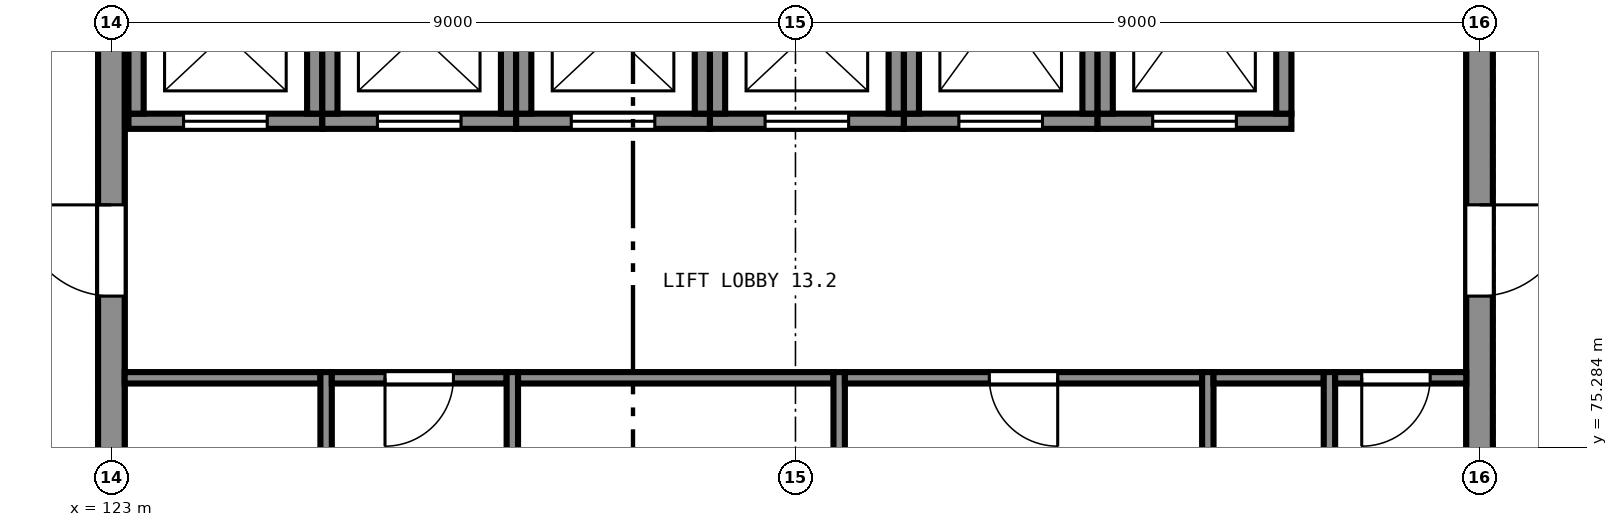
"""IFC4 building model, lengths in metres.
Left out: names, types, materials, properties, quantities, classifications, styles, units other than length and angle.
Written with IfcOpenShell. Run it as: python <this file> out.ifc"""

import sys

from ifc_helpers import new_model, si_unit, direction, frame, frame_2d, origin, place, context, subcontext, project, spatial, rectangle, extrude, element, fill, save


model = new_model("IFC4")
c1 = context("Model", 3, precision=1e-05, world=origin(), true_north=direction((0.0, 1.0)))
c2 = subcontext(c1, "Body", "Model", "MODEL_VIEW")
j1 = project(units=[si_unit("LENGTHUNIT", "METRE"), si_unit("PLANEANGLEUNIT", "RADIAN")], contexts=[c1])
p1 = place(None, origin())
s1 = spatial("IfcSite", under=j1, at=p1, CompositionType="ELEMENT")
p2 = place(p1, origin())
s2 = spatial("IfcBuilding", under=s1, at=p2, CompositionType="ELEMENT")
p3 = place(p2, frame((0.0, 0.0, 53.5)))
s3 = spatial("IfcBuildingStorey", under=s2, at=p3, CompositionType="ELEMENT", Elevation=53.5)
p4 = place(p3, frame((141.0, 65.175, 0.0), z_axis=(0.0, 0.0, 1.0), x_axis=(0.0, 1.0, 0.0)))
e1 = element("IfcWall", 1, at=p4, inside=s3, PredefinedType="SHEAR", context=c2, shape_type="SweptSolid", body=[
    extrude(rectangle(XDim=17.65, YDim=0.35, at=frame_2d((8.825, 0.0))), origin(), (0.0, 0.0, 1.0), 4.0),
])
p5 = place(p4, frame((4.35, 0.0, 0.0)))
e2 = element("IfcOpeningElement", 2, at=p5, cuts=e1, PredefinedType="OPENING", context=c2, shape_type="SweptSolid", body=[
    extrude(rectangle(XDim=1.2, YDim=2.1, at=frame_2d((0.6, 1.05))), frame((0.0, 0.185, 0.0), z_axis=(0.0, -1.0, 0.0), x_axis=(1.0, 0.0, 0.0)), (0.0, 0.0, 1.0), 0.37),
])
p6 = place(p4, frame((12.1, 0.0, 0.0)))
e3 = element("IfcOpeningElement", 3, at=p6, cuts=e1, PredefinedType="OPENING", context=c2, shape_type="SweptSolid", body=[
    extrude(rectangle(XDim=1.2, YDim=2.1, at=frame_2d((0.6, 1.05))), frame((0.0, 0.185, 0.0), z_axis=(0.0, -1.0, 0.0), x_axis=(1.0, 0.0, 0.0)), (0.0, 0.0, 1.0), 0.37),
])
p7 = place(p3, frame((123.0, 82.825, 0.0), z_axis=(0.0, 0.0, 1.0), x_axis=(0.0, -1.0, 0.0)))
e4 = element("IfcWall", 4, at=p7, inside=s3, PredefinedType="SHEAR", context=c2, shape_type="SweptSolid", body=[
    extrude(rectangle(XDim=17.65, YDim=0.35, at=frame_2d((8.825, 0.0))), origin(), (0.0, 0.0, 1.0), 4.0),
])
p8 = place(p7, frame((12.1, 0.0, 0.0)))
e5 = element("IfcOpeningElement", 5, at=p8, cuts=e4, PredefinedType="OPENING", context=c2, shape_type="SweptSolid", body=[
    extrude(rectangle(XDim=1.2, YDim=2.1, at=frame_2d((0.6, 1.05))), frame((0.0, 0.185, 0.0), z_axis=(0.0, -1.0, 0.0), x_axis=(1.0, 0.0, 0.0)), (0.0, 0.0, 1.0), 0.37),
])
p9 = place(p7, frame((4.35, 0.0, 0.0)))
e6 = element("IfcOpeningElement", 6, at=p9, cuts=e4, PredefinedType="OPENING", context=c2, shape_type="SweptSolid", body=[
    extrude(rectangle(XDim=1.2, YDim=2.1, at=frame_2d((0.6, 1.05))), frame((0.0, 0.185, 0.0), z_axis=(0.0, -1.0, 0.0), x_axis=(1.0, 0.0, 0.0)), (0.0, 0.0, 1.0), 0.37),
])
p10 = place(p3, frame((123.225, 79.575, 0.0), z_axis=(0.0, 0.0, 1.0), x_axis=(1.0, 0.0, 0.0)))
e7 = element("IfcWall", 7, at=p10, inside=s3, PredefinedType="SHEAR", context=c2, shape_type="SweptSolid", body=[
    extrude(rectangle(XDim=2.55, YDim=0.2, at=frame_2d((1.275, 0.0))), origin(), (0.0, 0.0, 1.0), 4.0),
])
p11 = place(p10, frame((0.725, 0.0, 0.0)))
e8 = element("IfcOpeningElement", 8, at=p11, cuts=e7, PredefinedType="OPENING", context=c2, shape_type="SweptSolid", body=[
    extrude(rectangle(XDim=1.1, YDim=2.1, at=frame_2d((0.55, 1.05))), frame((0.0, 0.11, 0.0), z_axis=(0.0, -1.0, 0.0), x_axis=(1.0, 0.0, 0.0)), (0.0, 0.0, 1.0), 0.22),
])
for number, where, z_axis, x_axis in (
    (9, (125.675, 79.675, 0.0), (0.0, 0.0, 1.0), (0.0, 1.0, 0.0)),
    (10, (123.325, 81.775, 0.0), (0.0, 0.0, 1.0), (0.0, -1.0, 0.0)),
):
    element("IfcWall", number, at=place(p3, frame(where, z_axis=z_axis, x_axis=x_axis)), inside=s3, PredefinedType="SHEAR", context=c2, shape_type="SweptSolid", body=[
        extrude(rectangle(XDim=2.1, YDim=0.2, at=frame_2d((1.05, 0.0))), origin(), (0.0, 0.0, 1.0), 4.0),
    ])
p12 = place(p3, frame((125.775, 79.575, 0.0), z_axis=(0.0, 0.0, 1.0), x_axis=(1.0, 0.0, 0.0)))
e11 = element("IfcWall", 11, at=p12, inside=s3, PredefinedType="SHEAR", context=c2, shape_type="SweptSolid", body=[
    extrude(rectangle(XDim=2.55, YDim=0.2, at=frame_2d((1.275, 0.0))), origin(), (0.0, 0.0, 1.0), 4.0),
])
p13 = place(p12, frame((0.725, 0.0, 0.0)))
e12 = element("IfcOpeningElement", 12, at=p13, cuts=e11, PredefinedType="OPENING", context=c2, shape_type="SweptSolid", body=[
    extrude(rectangle(XDim=1.1, YDim=2.1, at=frame_2d((0.55, 1.05))), frame((0.0, 0.11, 0.0), z_axis=(0.0, -1.0, 0.0), x_axis=(1.0, 0.0, 0.0)), (0.0, 0.0, 1.0), 0.22),
])
for number, where, z_axis, x_axis in (
    (13, (128.225, 79.675, 0.0), (0.0, 0.0, 1.0), (0.0, 1.0, 0.0)),
    (14, (125.875, 81.775, 0.0), (0.0, 0.0, 1.0), (0.0, -1.0, 0.0)),
):
    element("IfcWall", number, at=place(p3, frame(where, z_axis=z_axis, x_axis=x_axis)), inside=s3, PredefinedType="SHEAR", context=c2, shape_type="SweptSolid", body=[
        extrude(rectangle(XDim=2.1, YDim=0.2, at=frame_2d((1.05, 0.0))), origin(), (0.0, 0.0, 1.0), 4.0),
    ])
p14 = place(p3, frame((128.325, 79.575, 0.0), z_axis=(0.0, 0.0, 1.0), x_axis=(1.0, 0.0, 0.0)))
e15 = element("IfcWall", 15, at=p14, inside=s3, PredefinedType="SHEAR", context=c2, shape_type="SweptSolid", body=[
    extrude(rectangle(XDim=2.55, YDim=0.2, at=frame_2d((1.275, 0.0))), origin(), (0.0, 0.0, 1.0), 4.0),
])
p15 = place(p14, frame((0.725, 0.0, 0.0)))
e16 = element("IfcOpeningElement", 16, at=p15, cuts=e15, PredefinedType="OPENING", context=c2, shape_type="SweptSolid", body=[
    extrude(rectangle(XDim=1.1, YDim=2.1, at=frame_2d((0.55, 1.05))), frame((0.0, 0.11, 0.0), z_axis=(0.0, -1.0, 0.0), x_axis=(1.0, 0.0, 0.0)), (0.0, 0.0, 1.0), 0.22),
])
for number, where, z_axis, x_axis in (
    (17, (130.775, 79.675, 0.0), (0.0, 0.0, 1.0), (0.0, 1.0, 0.0)),
    (18, (128.425, 81.775, 0.0), (0.0, 0.0, 1.0), (0.0, -1.0, 0.0)),
):
    element("IfcWall", number, at=place(p3, frame(where, z_axis=z_axis, x_axis=x_axis)), inside=s3, PredefinedType="SHEAR", context=c2, shape_type="SweptSolid", body=[
        extrude(rectangle(XDim=2.1, YDim=0.2, at=frame_2d((1.05, 0.0))), origin(), (0.0, 0.0, 1.0), 4.0),
    ])
p16 = place(p3, frame((130.875, 79.575, 0.0), z_axis=(0.0, 0.0, 1.0), x_axis=(1.0, 0.0, 0.0)))
e19 = element("IfcWall", 19, at=p16, inside=s3, PredefinedType="SHEAR", context=c2, shape_type="SweptSolid", body=[
    extrude(rectangle(XDim=2.55, YDim=0.2, at=frame_2d((1.275, 0.0))), origin(), (0.0, 0.0, 1.0), 4.0),
])
p17 = place(p16, frame((0.725, 0.0, 0.0)))
e20 = element("IfcOpeningElement", 20, at=p17, cuts=e19, PredefinedType="OPENING", context=c2, shape_type="SweptSolid", body=[
    extrude(rectangle(XDim=1.1, YDim=2.1, at=frame_2d((0.55, 1.05))), frame((0.0, 0.11, 0.0), z_axis=(0.0, -1.0, 0.0), x_axis=(1.0, 0.0, 0.0)), (0.0, 0.0, 1.0), 0.22),
])
for number, where, z_axis, x_axis in (
    (21, (133.325, 79.675, 0.0), (0.0, 0.0, 1.0), (0.0, 1.0, 0.0)),
    (22, (130.975, 81.775, 0.0), (0.0, 0.0, 1.0), (0.0, -1.0, 0.0)),
):
    element("IfcWall", number, at=place(p3, frame(where, z_axis=z_axis, x_axis=x_axis)), inside=s3, PredefinedType="SHEAR", context=c2, shape_type="SweptSolid", body=[
        extrude(rectangle(XDim=2.1, YDim=0.2, at=frame_2d((1.05, 0.0))), origin(), (0.0, 0.0, 1.0), 4.0),
    ])
p18 = place(p3, frame((133.425, 79.575, 0.0), z_axis=(0.0, 0.0, 1.0), x_axis=(1.0, 0.0, 0.0)))
e23 = element("IfcWall", 23, at=p18, inside=s3, PredefinedType="SHEAR", context=c2, shape_type="SweptSolid", body=[
    extrude(rectangle(XDim=2.55, YDim=0.2, at=frame_2d((1.275, 0.0))), origin(), (0.0, 0.0, 1.0), 4.0),
])
p19 = place(p18, frame((0.725, 0.0, 0.0)))
e24 = element("IfcOpeningElement", 24, at=p19, cuts=e23, PredefinedType="OPENING", context=c2, shape_type="SweptSolid", body=[
    extrude(rectangle(XDim=1.1, YDim=2.1, at=frame_2d((0.55, 1.05))), frame((0.0, 0.11, 0.0), z_axis=(0.0, -1.0, 0.0), x_axis=(1.0, 0.0, 0.0)), (0.0, 0.0, 1.0), 0.22),
])
for number, where, z_axis, x_axis in (
    (25, (135.875, 79.675, 0.0), (0.0, 0.0, 1.0), (0.0, 1.0, 0.0)),
    (26, (133.525, 82.475, 0.0), (0.0, 0.0, 1.0), (0.0, -1.0, 0.0)),
):
    element("IfcWall", number, at=place(p3, frame(where, z_axis=z_axis, x_axis=x_axis)), inside=s3, PredefinedType="SHEAR", context=c2, shape_type="SweptSolid", body=[
        extrude(rectangle(XDim=2.8, YDim=0.2, at=frame_2d((1.4, 0.0))), origin(), (0.0, 0.0, 1.0), 4.0),
    ])
p20 = place(p3, frame((135.975, 79.575, 0.0), z_axis=(0.0, 0.0, 1.0), x_axis=(1.0, 0.0, 0.0)))
e27 = element("IfcWall", 27, at=p20, inside=s3, PredefinedType="SHEAR", context=c2, shape_type="SweptSolid", body=[
    extrude(rectangle(XDim=2.55, YDim=0.2, at=frame_2d((1.275, 0.0))), origin(), (0.0, 0.0, 1.0), 4.0),
])
p21 = place(p20, frame((0.725, 0.0, 0.0)))
e28 = element("IfcOpeningElement", 28, at=p21, cuts=e27, PredefinedType="OPENING", context=c2, shape_type="SweptSolid", body=[
    extrude(rectangle(XDim=1.1, YDim=2.1, at=frame_2d((0.55, 1.05))), frame((0.0, 0.11, 0.0), z_axis=(0.0, -1.0, 0.0), x_axis=(1.0, 0.0, 0.0)), (0.0, 0.0, 1.0), 0.22),
])
for number, where, z_axis, x_axis in (
    (29, (138.425, 79.675, 0.0), (0.0, 0.0, 1.0), (0.0, 1.0, 0.0)),
    (30, (136.075, 82.475, 0.0), (0.0, 0.0, 1.0), (0.0, -1.0, 0.0)),
):
    element("IfcWall", number, at=place(p3, frame(where, z_axis=z_axis, x_axis=x_axis)), inside=s3, PredefinedType="SHEAR", context=c2, shape_type="SweptSolid", body=[
        extrude(rectangle(XDim=2.8, YDim=0.2, at=frame_2d((1.4, 0.0))), origin(), (0.0, 0.0, 1.0), 4.0),
    ])
p22 = place(p3, frame((125.825, 71.725, 0.0), z_axis=(0.0, 0.0, 1.0), x_axis=(0.0, 1.0, 0.0)))
e31 = element("IfcWall", 31, at=p22, inside=s3, PredefinedType="PARTITIONING", context=c2, shape_type="SweptSolid", body=[
    extrude(rectangle(XDim=4.55, YDim=0.15, at=frame_2d((2.275, 0.0))), origin(), (0.0, 0.0, 1.0), 3.75),
])
p23 = place(p3, frame((123.175, 76.2, 0.0), z_axis=(0.0, 0.0, 1.0), x_axis=(1.0, 0.0, 0.0)))
e32 = element("IfcWall", 32, at=p23, inside=s3, PredefinedType="PARTITIONING", context=c2, shape_type="SweptSolid", body=[
    extrude(rectangle(XDim=2.575, YDim=0.15, at=frame_2d((1.288, 0.0))), origin(), (0.0, 0.0, 1.0), 3.75),
])
p24 = place(p3, frame((128.275, 71.725, 0.0), z_axis=(0.0, 0.0, 1.0), x_axis=(0.0, 1.0, 0.0)))
e33 = element("IfcWall", 33, at=p24, inside=s3, PredefinedType="PARTITIONING", context=c2, shape_type="SweptSolid", body=[
    extrude(rectangle(XDim=4.55, YDim=0.15, at=frame_2d((2.275, 0.0))), origin(), (0.0, 0.0, 1.0), 3.75),
])
p25 = place(p3, frame((125.9, 76.2, 0.0), z_axis=(0.0, 0.0, 1.0), x_axis=(1.0, 0.0, 0.0)))
e34 = element("IfcWall", 34, at=p25, inside=s3, PredefinedType="PARTITIONING", context=c2, shape_type="SweptSolid", body=[
    extrude(rectangle(XDim=2.3, YDim=0.15, at=frame_2d((1.15, 0.0))), origin(), (0.0, 0.0, 1.0), 3.75),
])
p26 = place(p25, frame((0.7, 0.0, 0.0)))
e35 = element("IfcOpeningElement", 35, at=p26, cuts=e34, PredefinedType="OPENING", context=c2, shape_type="SweptSolid", body=[
    extrude(rectangle(XDim=0.9, YDim=2.1, at=frame_2d((0.45, 1.05))), frame((0.0, 0.085, 0.0), z_axis=(0.0, -1.0, 0.0), x_axis=(1.0, 0.0, 0.0)), (0.0, 0.0, 1.0), 0.17),
])
p27 = place(p3, frame((132.575, 71.725, 0.0), z_axis=(0.0, 0.0, 1.0), x_axis=(0.0, 1.0, 0.0)))
e36 = element("IfcWall", 36, at=p27, inside=s3, PredefinedType="PARTITIONING", context=c2, shape_type="SweptSolid", body=[
    extrude(rectangle(XDim=4.55, YDim=0.15, at=frame_2d((2.275, 0.0))), origin(), (0.0, 0.0, 1.0), 3.75),
])
p28 = place(p3, frame((128.35, 76.2, 0.0), z_axis=(0.0, 0.0, 1.0), x_axis=(1.0, 0.0, 0.0)))
e37 = element("IfcWall", 37, at=p28, inside=s3, PredefinedType="PARTITIONING", context=c2, shape_type="SweptSolid", body=[
    extrude(rectangle(XDim=4.15, YDim=0.15, at=frame_2d((2.075, 0.0))), origin(), (0.0, 0.0, 1.0), 3.75),
])
p29 = place(p3, frame((137.425, 71.725, 0.0), z_axis=(0.0, 0.0, 1.0), x_axis=(0.0, 1.0, 0.0)))
e38 = element("IfcWall", 38, at=p29, inside=s3, PredefinedType="PARTITIONING", context=c2, shape_type="SweptSolid", body=[
    extrude(rectangle(XDim=4.55, YDim=0.15, at=frame_2d((2.275, 0.0))), origin(), (0.0, 0.0, 1.0), 3.75),
])
p30 = place(p3, frame((132.65, 76.2, 0.0), z_axis=(0.0, 0.0, 1.0), x_axis=(1.0, 0.0, 0.0)))
e39 = element("IfcWall", 39, at=p30, inside=s3, PredefinedType="PARTITIONING", context=c2, shape_type="SweptSolid", body=[
    extrude(rectangle(XDim=4.7, YDim=0.15, at=frame_2d((2.35, 0.0))), origin(), (0.0, 0.0, 1.0), 3.75),
])
p31 = place(p30, frame((1.9, 0.0, 0.0)))
e40 = element("IfcOpeningElement", 40, at=p31, cuts=e39, PredefinedType="OPENING", context=c2, shape_type="SweptSolid", body=[
    extrude(rectangle(XDim=0.9, YDim=2.1, at=frame_2d((0.45, 1.05))), frame((0.0, 0.085, 0.0), z_axis=(0.0, -1.0, 0.0), x_axis=(1.0, 0.0, 0.0)), (0.0, 0.0, 1.0), 0.17),
])
p32 = place(p3, frame((139.025, 71.725, 0.0), z_axis=(0.0, 0.0, 1.0), x_axis=(0.0, 1.0, 0.0)))
e41 = element("IfcWall", 41, at=p32, inside=s3, PredefinedType="PARTITIONING", context=c2, shape_type="SweptSolid", body=[
    extrude(rectangle(XDim=4.55, YDim=0.15, at=frame_2d((2.275, 0.0))), origin(), (0.0, 0.0, 1.0), 3.75),
])
p33 = place(p3, frame((137.5, 76.2, 0.0), z_axis=(0.0, 0.0, 1.0), x_axis=(1.0, 0.0, 0.0)))
e42 = element("IfcWall", 42, at=p33, inside=s3, PredefinedType="PARTITIONING", context=c2, shape_type="SweptSolid", body=[
    extrude(rectangle(XDim=1.45, YDim=0.15, at=frame_2d((0.725, 0.0))), origin(), (0.0, 0.0, 1.0), 3.75),
])
p34 = place(p3, frame((139.1, 76.2, 0.0), z_axis=(0.0, 0.0, 1.0), x_axis=(1.0, 0.0, 0.0)))
e43 = element("IfcWall", 43, at=p34, inside=s3, PredefinedType="PARTITIONING", context=c2, shape_type="SweptSolid", body=[
    extrude(rectangle(XDim=1.725, YDim=0.15, at=frame_2d((0.862, 0.0))), origin(), (0.0, 0.0, 1.0), 3.75),
])
p35 = place(p34, frame((0.35, 0.0, 0.0)))
e44 = element("IfcOpeningElement", 44, at=p35, cuts=e43, PredefinedType="OPENING", context=c2, shape_type="SweptSolid", body=[
    extrude(rectangle(XDim=0.9, YDim=2.1, at=frame_2d((0.45, 1.05))), frame((0.0, 0.085, 0.0), z_axis=(0.0, -1.0, 0.0), x_axis=(1.0, 0.0, 0.0)), (0.0, 0.0, 1.0), 0.17),
])
p36 = place(p11, origin())
e45 = element("IfcDoor", 45, at=p36, inside=s3, OperationType="SLIDING_TO_LEFT", PredefinedType="DOOR", context=c2, shape_type="SweptSolid", body=[
    extrude(rectangle(XDim=1.1, YDim=2.1, at=frame_2d((0.55, 1.05))), frame((0.0, 0.025, 0.0), z_axis=(0.0, -1.0, 0.0), x_axis=(1.0, 0.0, 0.0)), (0.0, 0.0, 1.0), 0.05),
])
fill(e8, e45)
p37 = place(p13, origin())
e46 = element("IfcDoor", 46, at=p37, inside=s3, OperationType="SLIDING_TO_LEFT", PredefinedType="DOOR", context=c2, shape_type="SweptSolid", body=[
    extrude(rectangle(XDim=1.1, YDim=2.1, at=frame_2d((0.55, 1.05))), frame((0.0, 0.025, 0.0), z_axis=(0.0, -1.0, 0.0), x_axis=(1.0, 0.0, 0.0)), (0.0, 0.0, 1.0), 0.05),
])
fill(e12, e46)
p38 = place(p15, origin())
e47 = element("IfcDoor", 47, at=p38, inside=s3, OperationType="SLIDING_TO_LEFT", PredefinedType="DOOR", context=c2, shape_type="SweptSolid", body=[
    extrude(rectangle(XDim=1.1, YDim=2.1, at=frame_2d((0.55, 1.05))), frame((0.0, 0.025, 0.0), z_axis=(0.0, -1.0, 0.0), x_axis=(1.0, 0.0, 0.0)), (0.0, 0.0, 1.0), 0.05),
])
fill(e16, e47)
p39 = place(p17, origin())
e48 = element("IfcDoor", 48, at=p39, inside=s3, OperationType="SLIDING_TO_LEFT", PredefinedType="DOOR", context=c2, shape_type="SweptSolid", body=[
    extrude(rectangle(XDim=1.1, YDim=2.1, at=frame_2d((0.55, 1.05))), frame((0.0, 0.025, 0.0), z_axis=(0.0, -1.0, 0.0), x_axis=(1.0, 0.0, 0.0)), (0.0, 0.0, 1.0), 0.05),
])
fill(e20, e48)
p40 = place(p19, origin())
e49 = element("IfcDoor", 49, at=p40, inside=s3, OperationType="SLIDING_TO_LEFT", PredefinedType="DOOR", context=c2, shape_type="SweptSolid", body=[
    extrude(rectangle(XDim=1.1, YDim=2.1, at=frame_2d((0.55, 1.05))), frame((0.0, 0.025, 0.0), z_axis=(0.0, -1.0, 0.0), x_axis=(1.0, 0.0, 0.0)), (0.0, 0.0, 1.0), 0.05),
])
fill(e24, e49)
p41 = place(p21, origin())
e50 = element("IfcDoor", 50, at=p41, inside=s3, OperationType="SLIDING_TO_LEFT", PredefinedType="DOOR", context=c2, shape_type="SweptSolid", body=[
    extrude(rectangle(XDim=1.1, YDim=2.1, at=frame_2d((0.55, 1.05))), frame((0.0, 0.025, 0.0), z_axis=(0.0, -1.0, 0.0), x_axis=(1.0, 0.0, 0.0)), (0.0, 0.0, 1.0), 0.05),
])
fill(e28, e50)
p42 = place(p9, frame((1.2, 0.0, 0.0), z_axis=(0.0, 0.0, 1.0), x_axis=(-1.0, 0.0, 0.0)))
e51 = element("IfcDoor", 51, at=p42, inside=s3, OperationType="SINGLE_SWING_LEFT", PredefinedType="DOOR", context=c2, shape_type="SweptSolid", body=[
    extrude(rectangle(XDim=1.2, YDim=2.1, at=frame_2d((0.6, 1.05))), frame((0.0, 0.025, 0.0), z_axis=(0.0, -1.0, 0.0), x_axis=(1.0, 0.0, 0.0)), (0.0, 0.0, 1.0), 0.05),
])
fill(e6, e51)
p43 = place(p6, frame((1.2, 0.0, 0.0), z_axis=(0.0, 0.0, 1.0), x_axis=(-1.0, 0.0, 0.0)))
e52 = element("IfcDoor", 52, at=p43, inside=s3, OperationType="SINGLE_SWING_RIGHT", PredefinedType="DOOR", context=c2, shape_type="SweptSolid", body=[
    extrude(rectangle(XDim=1.2, YDim=2.1, at=frame_2d((0.6, 1.05))), frame((0.0, 0.025, 0.0), z_axis=(0.0, -1.0, 0.0), x_axis=(1.0, 0.0, 0.0)), (0.0, 0.0, 1.0), 0.05),
])
fill(e3, e52)
p44 = place(p26, frame((0.9, 0.0, 0.0), z_axis=(0.0, 0.0, 1.0), x_axis=(-1.0, 0.0, 0.0)))
e53 = element("IfcDoor", 53, at=p44, inside=s3, OperationType="SINGLE_SWING_LEFT", PredefinedType="DOOR", context=c2, shape_type="SweptSolid", body=[
    extrude(rectangle(XDim=0.9, YDim=2.1, at=frame_2d((0.45, 1.05))), frame((0.0, 0.025, 0.0), z_axis=(0.0, -1.0, 0.0), x_axis=(1.0, 0.0, 0.0)), (0.0, 0.0, 1.0), 0.05),
])
fill(e35, e53)
p45 = place(p31, frame((0.9, 0.0, 0.0), z_axis=(0.0, 0.0, 1.0), x_axis=(-1.0, 0.0, 0.0)))
e54 = element("IfcDoor", 54, at=p45, inside=s3, OperationType="SINGLE_SWING_RIGHT", PredefinedType="DOOR", context=c2, shape_type="SweptSolid", body=[
    extrude(rectangle(XDim=0.9, YDim=2.1, at=frame_2d((0.45, 1.05))), frame((0.0, 0.025, 0.0), z_axis=(0.0, -1.0, 0.0), x_axis=(1.0, 0.0, 0.0)), (0.0, 0.0, 1.0), 0.05),
])
fill(e40, e54)
p46 = place(p35, frame((0.9, 0.0, 0.0), z_axis=(0.0, 0.0, 1.0), x_axis=(-1.0, 0.0, 0.0)))
e55 = element("IfcDoor", 55, at=p46, inside=s3, OperationType="SINGLE_SWING_LEFT", PredefinedType="DOOR", context=c2, shape_type="SweptSolid", body=[
    extrude(rectangle(XDim=0.9, YDim=2.1, at=frame_2d((0.45, 1.05))), frame((0.0, 0.025, 0.0), z_axis=(0.0, -1.0, 0.0), x_axis=(1.0, 0.0, 0.0)), (0.0, 0.0, 1.0), 0.05),
])
fill(e44, e55)
save(model, sys.argv[1])
